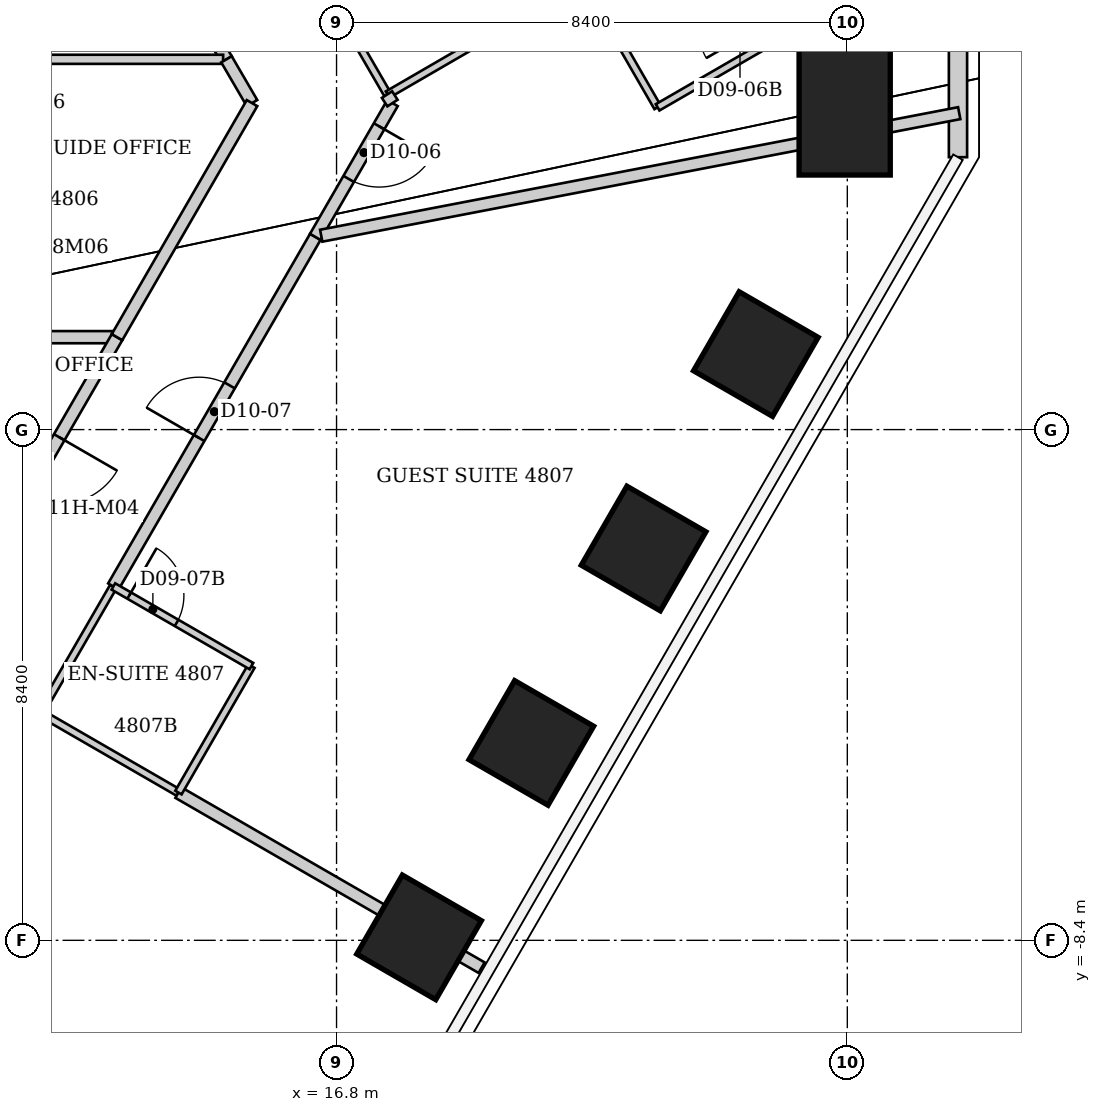
"""IFC4 building model, lengths in metres.
Left out: names, types, materials, properties, quantities, classifications, styles, units other than length and angle.
Written with IfcOpenShell. Run it as: python <this file> out.ifc"""

import sys

from ifc_helpers import new_model, si_unit, direction, frame, frame_2d, origin, origin_2d, place, context, subcontext, project, spatial, rectangle, extrude, element, fill, save


model = new_model("IFC4")
c1 = context("Model", 3, precision=1e-05, world=origin(), true_north=direction((0.0, 1.0)))
c2 = subcontext(c1, "Body", "Model", "MODEL_VIEW")
j1 = project(units=[si_unit("LENGTHUNIT", "METRE"), si_unit("PLANEANGLEUNIT", "RADIAN")], contexts=[c1])
p1 = place(None, origin())
s1 = spatial("IfcSite", under=j1, at=p1, CompositionType="ELEMENT")
p2 = place(p1, origin())
s2 = spatial("IfcBuilding", under=s1, at=p2, CompositionType="ELEMENT")
p3 = place(p2, frame((0.0, 0.0, 194.6)))
s3 = spatial("IfcBuildingStorey", under=s2, at=p3, CompositionType="ELEMENT", Elevation=194.6)
p4 = place(p3, frame((25.156, 5.311, 0.0), z_axis=(0.0, 0.0, 1.0), x_axis=(1.0, 0.0, 0.0)))
e1 = element("IfcColumn", 1, at=p4, inside=s3, PredefinedType="COLUMN", context=c2, shape_type="SweptSolid", body=[
    extrude(rectangle(XDim=1.5, YDim=2.25, at=origin_2d()), origin(), (0.0, 0.0, 1.0), 3.8),
])
for number, where, z_axis, x_axis in (
    (2, (23.696, 1.242, 0.0), (0.0, 0.0, 1.0), (0.866, -0.5, 0.0)),
    (3, (21.85, -1.956, 0.0), (0.0, 0.0, 1.0), (0.866, -0.5, 0.0)),
    (4, (20.003, -5.153, 0.0), (0.0, 0.0, 1.0), (0.866, -0.5, 0.0)),
    (5, (18.157, -8.351, 0.0), (0.0, 0.0, 1.0), (0.866, -0.5, 0.0)),
):
    element("IfcColumn", number, at=place(p3, frame(where, z_axis=z_axis, x_axis=x_axis)), inside=s3, PredefinedType="COLUMN", context=c2, shape_type="SweptSolid", body=[
        extrude(rectangle(XDim=1.5, YDim=1.5, at=origin_2d()), origin(), (0.0, 0.0, 1.0), 3.8),
    ])
p5 = place(p3, frame((27.02, 6.25, 0.0), z_axis=(0.0, 0.0, 1.0), x_axis=(0.0, -1.0, 0.0)))
e6 = element("IfcWall", 6, at=p5, inside=s3, PredefinedType="SOLIDWALL", context=c2, shape_type="SweptSolid", body=[
    extrude(rectangle(XDim=1.77, YDim=0.3, at=frame_2d((0.885, 0.0))), origin(), (0.0, 0.0, 1.0), 3.64),
])
p6 = place(p3, frame((10.56, 1.52, 0.0), z_axis=(0.0, 0.0, 1.0), x_axis=(1.0, 0.0, 0.0)))
e7 = element("IfcWall", 7, at=p6, inside=s3, PredefinedType="PARTITIONING", context=c2, shape_type="SweptSolid", body=[
    extrude(rectangle(XDim=2.55, YDim=0.2, at=frame_2d((1.275, 0.0))), origin(), (0.0, 0.0, 1.0), 3.64),
])
p7 = place(p3, frame((11.928, -4.659, 0.0), z_axis=(0.0, 0.0, 1.0), x_axis=(0.500643444581, 0.865653592032, 0.0)))
e8 = element("IfcWall", 8, at=p7, inside=s3, PredefinedType="PARTITIONING", context=c2, shape_type="SweptSolid", body=[
    extrude(rectangle(XDim=2.401, YDim=0.12, at=frame_2d((1.201, 0.0))), origin(), (0.0, 0.0, 1.0), 3.64),
])
p8 = place(p3, frame((11.93, -4.66, 0.0), z_axis=(0.0, 0.0, 1.0), x_axis=(0.865969958829, -0.500096021185, 0.0)))
e9 = element("IfcWall", 9, at=p8, inside=s3, PredefinedType="PARTITIONING", context=c2, shape_type="SweptSolid", body=[
    extrude(rectangle(XDim=2.621, YDim=0.12, at=frame_2d((1.311, 0.0))), origin(), (0.0, 0.0, 1.0), 3.038),
])
p9 = place(p3, frame((12.35, 10.66, 0.0), z_axis=(0.0, 0.0, 1.0), x_axis=(0.500213626659, -0.86590203124, 0.0)))
e10 = element("IfcWall", 10, at=p9, inside=s3, PredefinedType="PARTITIONING", context=c2, shape_type="SweptSolid", body=[
    extrude(rectangle(XDim=5.278, YDim=0.2, at=frame_2d((2.639, 0.0))), origin(), (0.0, 0.0, 1.0), 3.64),
])
p10 = place(p9, frame((2.089, 0.0, 0.0)))
e11 = element("IfcOpeningElement", 11, at=p10, cuts=e10, PredefinedType="OPENING", context=c2, shape_type="SweptSolid", body=[
    extrude(rectangle(XDim=1.1, YDim=2.2, at=frame_2d((0.55, 1.1))), frame((0.0, 0.1, 0.0), z_axis=(0.0, -1.0, 0.0), x_axis=(1.0, 0.0, 0.0)), (0.0, 0.0, 1.0), 0.2),
])
p11 = place(p3, frame((13.13, -2.58, 0.0), z_axis=(0.0, 0.0, 1.0), x_axis=(0.500148944124, 0.865939393775, 0.0)))
e12 = element("IfcWall", 12, at=p11, inside=s3, PredefinedType="PARTITIONING", context=c2, shape_type="SweptSolid", body=[
    extrude(rectangle(XDim=6.64, YDim=0.2, at=frame_2d((3.32, 0.0))), origin(), (0.0, 0.0, 1.0), 3.64),
])
p12 = place(p11, frame((2.82, 0.0, 0.0)))
e13 = element("IfcOpeningElement", 13, at=p12, cuts=e12, PredefinedType="OPENING", context=c2, shape_type="SweptSolid", body=[
    extrude(rectangle(XDim=1.0, YDim=2.13, at=frame_2d((0.5, 1.065))), frame((0.0, 0.1, 0.0), z_axis=(0.0, -1.0, 0.0), x_axis=(1.0, 0.0, 0.0)), (0.0, 0.0, 1.0), 0.2),
])
p13 = place(p3, frame((13.19, 1.52, 0.0), z_axis=(0.0, 0.0, 1.0), x_axis=(-0.500193590286, -0.865913605527, 0.0)))
e14 = element("IfcWall", 14, at=p13, inside=s3, PredefinedType="PARTITIONING", context=c2, shape_type="SweptSolid", body=[
    extrude(rectangle(XDim=5.278, YDim=0.2, at=frame_2d((2.639, 0.0))), origin(), (0.0, 0.0, 1.0), 3.64),
])
p14 = place(p13, frame((1.9, 0.0, 0.0)))
e15 = element("IfcOpeningElement", 15, at=p14, cuts=e14, PredefinedType="OPENING", context=c2, shape_type="SweptSolid", body=[
    extrude(rectangle(XDim=1.1, YDim=2.2, at=frame_2d((0.55, 1.1))), frame((0.0, 0.1, 0.0), z_axis=(0.0, -1.0, 0.0), x_axis=(1.0, 0.0, 0.0)), (0.0, 0.0, 1.0), 0.2),
])
p15 = place(p3, frame((14.2, -5.971, 0.0), z_axis=(0.0, 0.0, 1.0), x_axis=(0.86600340545, -0.500038100297, 0.0)))
e16 = element("IfcWall", 16, at=p15, inside=s3, PredefinedType="PARTITIONING", context=c2, shape_type="SweptSolid", body=[
    extrude(rectangle(XDim=5.758, YDim=0.2, at=frame_2d((2.879, 0.0))), origin(), (0.0, 0.0, 1.0), 3.038),
])
p16 = place(p3, frame((14.2, -5.97, 0.0), z_axis=(0.0, 0.0, 1.0), x_axis=(0.499737123639, 0.866177122335, 0.0)))
e17 = element("IfcWall", 17, at=p16, inside=s3, PredefinedType="PARTITIONING", context=c2, shape_type="SweptSolid", body=[
    extrude(rectangle(XDim=2.401, YDim=0.12, at=frame_2d((1.201, 0.0))), origin(), (0.0, 0.0, 1.0), 3.64),
])
p17 = place(p3, frame((14.935, 6.09, 0.0), z_axis=(0.0, 0.0, 1.0), x_axis=(-1.0, 0.0, 0.0)))
e18 = element("IfcWall", 18, at=p17, inside=s3, PredefinedType="PARTITIONING", context=c2, shape_type="SweptSolid", body=[
    extrude(rectangle(XDim=4.385, YDim=0.15, at=frame_2d((2.192, 0.0))), origin(), (0.0, 0.0, 1.0), 3.64),
])
p18 = place(p3, frame((14.99, 6.09, 0.0), z_axis=(0.0, 0.0, 1.0), x_axis=(0.503816387241, -0.863810770914, 0.0)))
e19 = element("IfcWall", 19, at=p18, inside=s3, PredefinedType="PARTITIONING", context=c2, shape_type="SweptSolid", body=[
    extrude(rectangle(XDim=0.833, YDim=0.2, at=frame_2d((0.417, 0.0))), origin(), (0.0, 0.0, 1.0), 3.64),
])
p19 = place(p3, frame((15.4, -3.89, 0.0), z_axis=(0.0, 0.0, 1.0), x_axis=(-0.866154567199, 0.49977621564, 0.0)))
e20 = element("IfcWall", 20, at=p19, inside=s3, PredefinedType="PARTITIONING", context=c2, shape_type="SweptSolid", body=[
    extrude(rectangle(XDim=2.621, YDim=0.12, at=frame_2d((1.311, 0.0))), origin(), (0.0, 0.0, 1.0), 3.64),
])
p20 = place(p19, frame((1.421, 0.0, 0.0)))
e21 = element("IfcOpeningElement", 21, at=p20, cuts=e20, PredefinedType="OPENING", context=c2, shape_type="SweptSolid", body=[
    extrude(rectangle(XDim=0.9, YDim=2.03, at=frame_2d((0.45, 1.015))), frame((0.0, 0.06, 0.0), z_axis=(0.0, -1.0, 0.0), x_axis=(1.0, 0.0, 0.0)), (0.0, 0.0, 1.0), 0.12),
])
p21 = place(p3, frame((15.41, 5.37, 0.0), z_axis=(0.0, 0.0, 1.0), x_axis=(-0.499513190454, -0.866306281036, 0.0)))
e22 = element("IfcWall", 22, at=p21, inside=s3, PredefinedType="PARTITIONING", context=c2, shape_type="SweptSolid", body=[
    extrude(rectangle(XDim=4.444, YDim=0.2, at=frame_2d((2.222, 0.0))), origin(), (0.0, 0.0, 1.0), 3.64),
])
p22 = place(p3, frame((16.41, 7.63, 0.0), z_axis=(0.0, 0.0, 1.0), x_axis=(0.501856726365, -0.86495076519, 0.0)))
e23 = element("IfcWall", 23, at=p22, inside=s3, PredefinedType="PARTITIONING", context=c2, shape_type="SweptSolid", body=[
    extrude(rectangle(XDim=2.451, YDim=0.12, at=frame_2d((1.226, 0.0))), origin(), (0.0, 0.0, 1.0), 3.64),
])
p23 = place(p3, frame((16.45, 3.17, 0.0), z_axis=(0.0, 0.0, 1.0), x_axis=(0.499922110319, 0.866070368743, 0.0)))
e24 = element("IfcWall", 24, at=p23, inside=s3, PredefinedType="PARTITIONING", context=c2, shape_type="SweptSolid", body=[
    extrude(rectangle(XDim=2.541, YDim=0.2, at=frame_2d((1.27, 0.0))), origin(), (0.0, 0.0, 1.0), 3.64),
])
p24 = place(p23, frame((1.1, 0.0, 0.0)))
e25 = element("IfcOpeningElement", 25, at=p24, cuts=e24, PredefinedType="OPENING", context=c2, shape_type="SweptSolid", body=[
    extrude(rectangle(XDim=1.0, YDim=2.13, at=frame_2d((0.5, 1.065))), frame((0.0, 0.1, 0.0), z_axis=(0.0, -1.0, 0.0), x_axis=(1.0, 0.0, 0.0)), (0.0, 0.0, 1.0), 0.2),
])
p25 = place(p3, frame((16.548, 3.189, 0.0), z_axis=(0.0, 0.0, 1.0), x_axis=(0.982047984466, 0.188631270488, 0.0)))
e26 = element("IfcWall", 26, at=p25, inside=s3, PredefinedType="PARTITIONING", context=c2, shape_type="SweptSolid", body=[
    extrude(rectangle(XDim=10.684, YDim=0.2, at=frame_2d((5.342, 0.0))), origin(), (0.0, 0.0, 1.0), 3.64),
])
p26 = place(p3, frame((17.64, 5.51, 0.0), z_axis=(0.0, 0.0, 1.0), x_axis=(0.86498992408, 0.501789229896, 0.0)))
e27 = element("IfcWall", 27, at=p26, inside=s3, PredefinedType="PARTITIONING", context=c2, shape_type="SweptSolid", body=[
    extrude(rectangle(XDim=2.671, YDim=0.12, at=frame_2d((1.335, 0.0))), origin(), (0.0, 0.0, 1.0), 3.64),
])
p27 = place(p3, frame((17.72, 5.37, 0.0), z_axis=(0.0, 0.0, 1.0), x_axis=(-0.540386452408, 0.841416948994, 0.0)))
e28 = element("IfcWall", 28, at=p27, inside=s3, PredefinedType="PARTITIONING", context=c2, shape_type="SweptSolid", body=[
    extrude(rectangle(XDim=0.166, YDim=0.2, at=frame_2d((0.083, 0.0))), origin(), (0.0, 0.0, 1.0), 3.64),
])
p28 = place(p3, frame((20.88, 7.38, 0.0), z_axis=(0.0, 0.0, 1.0), x_axis=(0.499813401482, -0.866133109688, 0.0)))
e29 = element("IfcWall", 29, at=p28, inside=s3, PredefinedType="PARTITIONING", context=c2, shape_type="SweptSolid", body=[
    extrude(rectangle(XDim=2.401, YDim=0.12, at=frame_2d((1.201, 0.0))), origin(), (0.0, 0.0, 1.0), 3.64),
])
p29 = place(p3, frame((22.08, 5.3, 0.0), z_axis=(0.0, 0.0, 1.0), x_axis=(0.865766263046, 0.50044857655, 0.0)))
e30 = element("IfcWall", 30, at=p29, inside=s3, PredefinedType="PARTITIONING", context=c2, shape_type="SweptSolid", body=[
    extrude(rectangle(XDim=1.998, YDim=0.12, at=frame_2d((0.999, 0.0))), origin(), (0.0, 0.0, 1.0), 3.64),
])
p30 = place(p24, origin())
e31 = element("IfcDoor", 31, at=p30, inside=s3, OperationType="SINGLE_SWING_RIGHT", PredefinedType="DOOR", context=c2, shape_type="SweptSolid", body=[
    extrude(rectangle(XDim=1.0, YDim=2.13, at=frame_2d((0.5, 1.065))), frame((0.0, 0.025, 0.0), z_axis=(0.0, -1.0, 0.0), x_axis=(1.0, 0.0, 0.0)), (0.0, 0.0, 1.0), 0.05),
])
fill(e25, e31)
p31 = place(p12, origin())
e32 = element("IfcDoor", 32, at=p31, inside=s3, OperationType="SINGLE_SWING_LEFT", PredefinedType="DOOR", context=c2, shape_type="SweptSolid", body=[
    extrude(rectangle(XDim=1.0, YDim=2.13, at=frame_2d((0.5, 1.065))), frame((0.0, 0.025, 0.0), z_axis=(0.0, -1.0, 0.0), x_axis=(1.0, 0.0, 0.0)), (0.0, 0.0, 1.0), 0.05),
])
fill(e13, e32)
p32 = place(p20, origin())
e33 = element("IfcDoor", 33, at=p32, inside=s3, OperationType="SINGLE_SWING_RIGHT", PredefinedType="DOOR", context=c2, shape_type="SweptSolid", body=[
    extrude(rectangle(XDim=0.9, YDim=2.03, at=frame_2d((0.45, 1.015))), frame((0.0, 0.025, 0.0), z_axis=(0.0, -1.0, 0.0), x_axis=(1.0, 0.0, 0.0)), (0.0, 0.0, 1.0), 0.05),
])
fill(e21, e33)
p33 = place(p14, origin())
e34 = element("IfcDoor", 34, at=p33, inside=s3, OperationType="SINGLE_SWING_LEFT", PredefinedType="DOOR", context=c2, shape_type="SweptSolid", body=[
    extrude(rectangle(XDim=1.1, YDim=2.2, at=frame_2d((0.55, 1.1))), frame((0.0, 0.025, 0.0), z_axis=(0.0, -1.0, 0.0), x_axis=(1.0, 0.0, 0.0)), (0.0, 0.0, 1.0), 0.05),
])
fill(e15, e34)
save(model, sys.argv[1])
